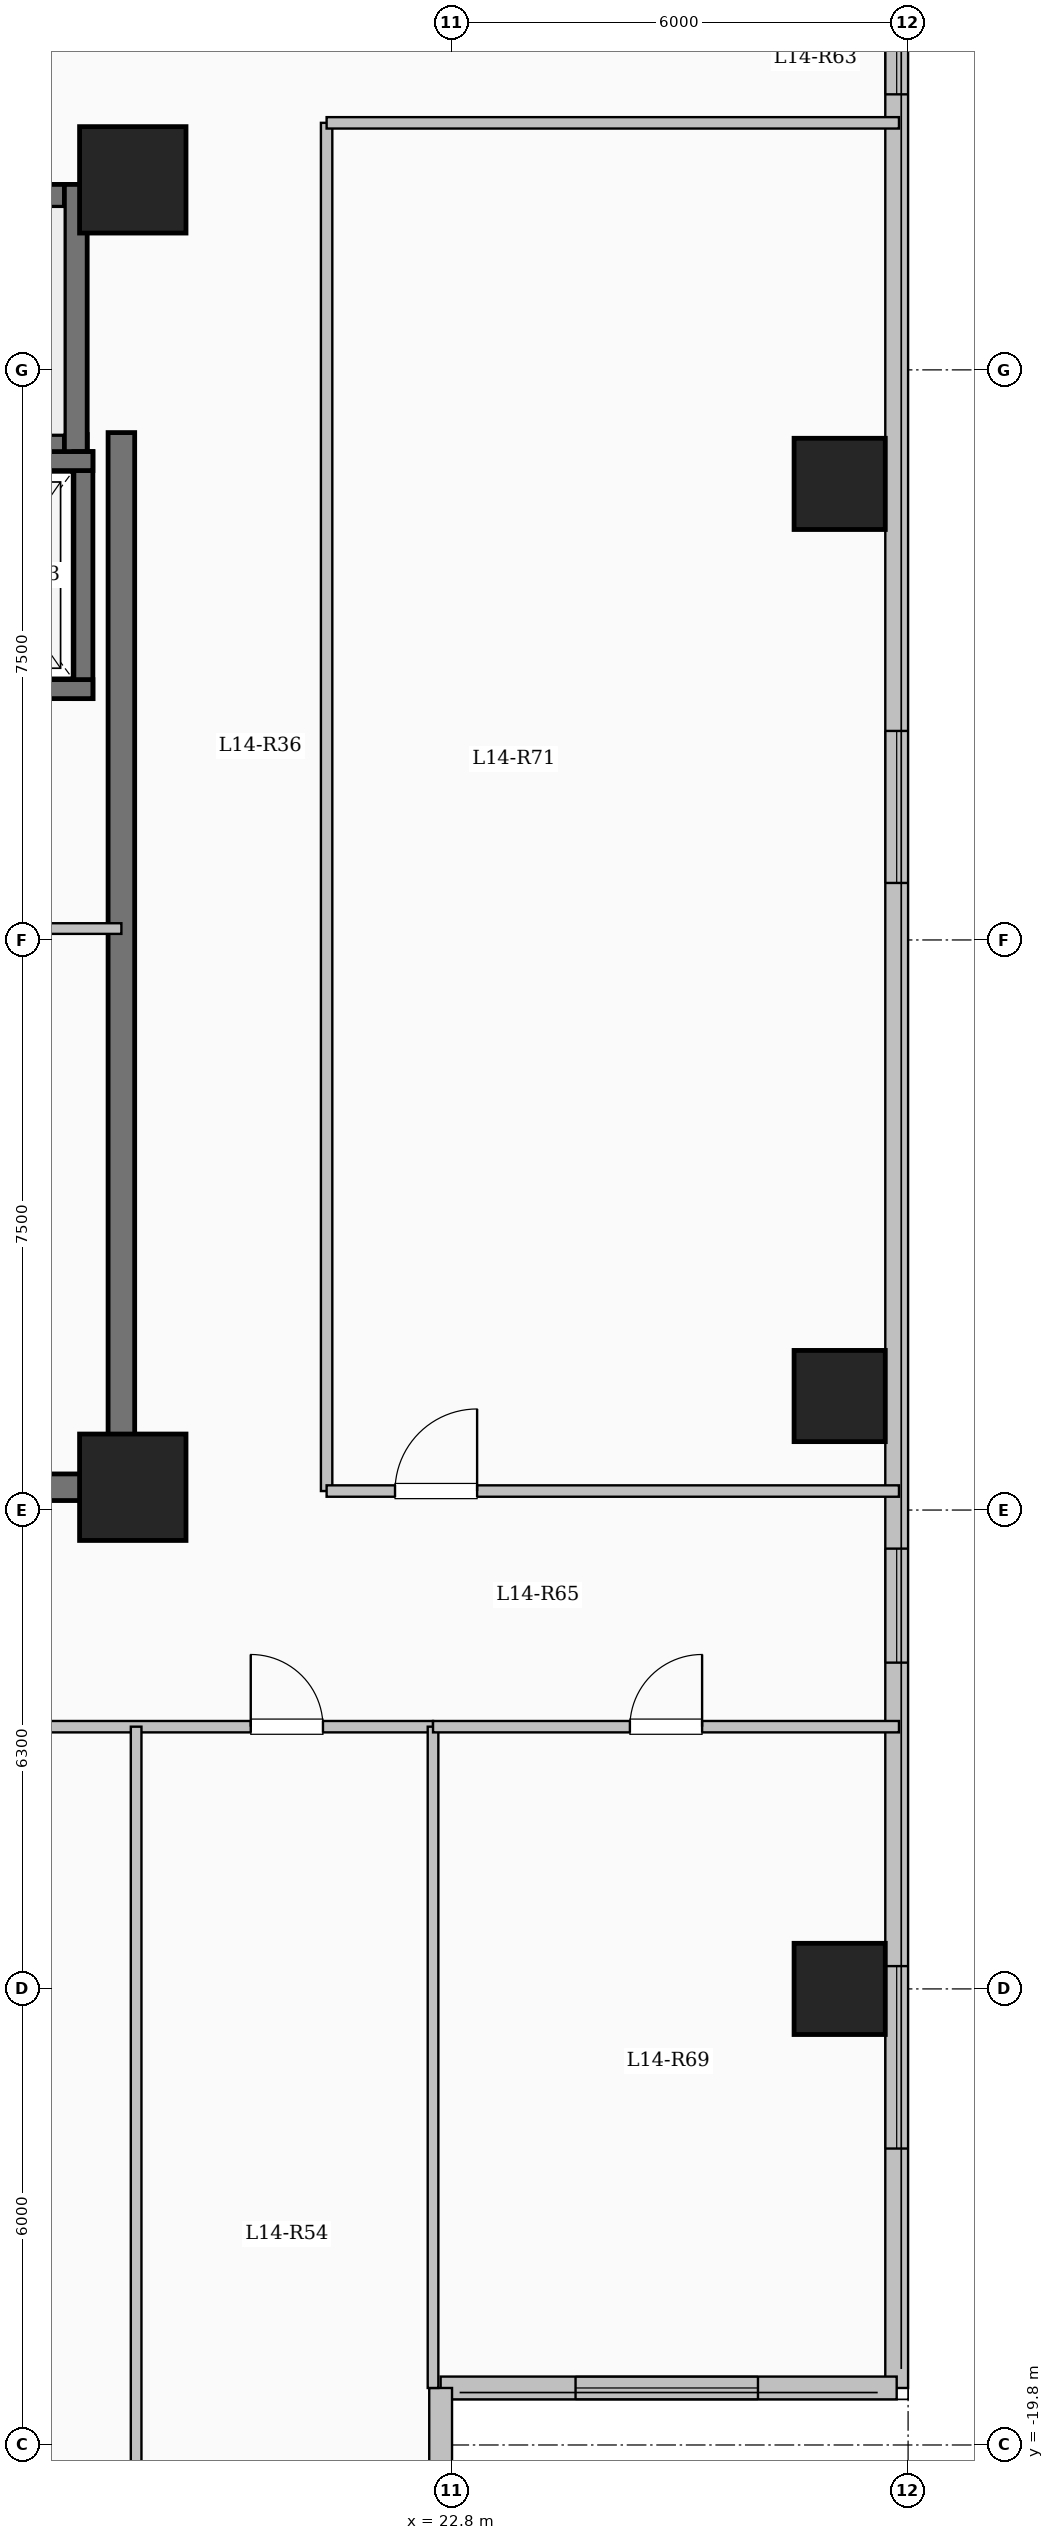
"""IFC4 building model, lengths in metres.
Left out: names, types, materials, properties, quantities, classifications, styles, units other than length and angle.
Written with IfcOpenShell. Run it as: python <this file> out.ifc"""

import sys

from ifc_helpers import new_model, si_unit, direction, frame, frame_2d, origin, origin_2d, place, context, subcontext, project, spatial, rectangle, extrude, element, fill, save


model = new_model("IFC4")
c1 = context("Model", 3, precision=1e-05, world=origin(), true_north=direction((0.0, 1.0)))
c2 = subcontext(c1, "Body", "Model", "MODEL_VIEW")
j1 = project(units=[si_unit("LENGTHUNIT", "METRE"), si_unit("PLANEANGLEUNIT", "RADIAN")], contexts=[c1])
p1 = place(None, origin())
s1 = spatial("IfcSite", under=j1, at=p1, CompositionType="ELEMENT")
p2 = place(p1, origin())
s2 = spatial("IfcBuilding", under=s1, at=p2, CompositionType="ELEMENT")
p3 = place(p2, frame((0.0, 0.0, 54.15)))
s3 = spatial("IfcBuildingStorey", under=s2, at=p3, CompositionType="ELEMENT", Elevation=54.15)
for number, where, z_axis, x_axis in (
    (1, (18.6, -7.2, 0.0), (0.0, 0.0, 1.0), (1.0, 0.0, 0.0)),
    (2, (18.6, 10.0, 0.0), (0.0, 0.0, 1.0), (1.0, 0.0, 0.0)),
):
    element("IfcColumn", number, at=place(p3, frame(where, z_axis=z_axis, x_axis=x_axis)), inside=s3, PredefinedType="COLUMN", context=c2, shape_type="SweptSolid", body=[
        extrude(rectangle(XDim=1.4, YDim=1.4, at=origin_2d()), origin(), (0.0, 0.0, 1.0), 3.35),
    ])
for number, where, z_axis, x_axis in (
    (3, (27.9, -13.8, 0.0), (0.0, 0.0, 1.0), (1.0, 0.0, 0.0)),
    (4, (27.9, -6.0, 0.0), (0.0, 0.0, 1.0), (1.0, 0.0, 0.0)),
    (5, (27.9, 6.0, 0.0), (0.0, 0.0, 1.0), (1.0, 0.0, 0.0)),
):
    element("IfcColumn", number, at=place(p3, frame(where, z_axis=z_axis, x_axis=x_axis)), inside=s3, PredefinedType="COLUMN", context=c2, shape_type="SweptSolid", body=[
        extrude(rectangle(XDim=1.2, YDim=1.2, at=origin_2d()), origin(), (0.0, 0.0, 1.0), 3.35),
    ])
p4 = place(p3, frame((28.65, 19.05, 0.0), z_axis=(0.0, 0.0, 1.0), x_axis=(0.0, -1.0, 0.0)))
e6 = element("IfcWall", 6, at=p4, inside=s3, PredefinedType="SOLIDWALL", context=c2, shape_type="SweptSolid", body=[
    extrude(rectangle(XDim=38.1, YDim=0.3, at=frame_2d((19.05, 0.0))), origin(), (0.0, 0.0, 1.0), 3.1),
])
p5 = place(p4, frame((2.275, 0.0, 0.9)))
e7 = element("IfcOpeningElement", 7, at=p5, cuts=e6, PredefinedType="OPENING", context=c2, shape_type="SweptSolid", body=[
    extrude(rectangle(XDim=2.0, YDim=1.7, at=frame_2d((1.0, 0.85))), frame((0.0, 0.16, 0.0), z_axis=(0.0, -1.0, 0.0), x_axis=(1.0, 0.0, 0.0)), (0.0, 0.0, 1.0), 0.32),
])
p6 = place(p4, frame((6.925, 0.0, 0.95)))
e8 = element("IfcOpeningElement", 8, at=p6, cuts=e6, PredefinedType="OPENING", context=c2, shape_type="SweptSolid", body=[
    extrude(rectangle(XDim=1.0, YDim=1.5, at=frame_2d((0.5, 0.75))), frame((0.0, 0.16, 0.0), z_axis=(0.0, -1.0, 0.0), x_axis=(1.0, 0.0, 0.0)), (0.0, 0.0, 1.0), 0.32),
])
p7 = place(p4, frame((16.3, 0.0, 0.9)))
e9 = element("IfcOpeningElement", 9, at=p7, cuts=e6, PredefinedType="OPENING", context=c2, shape_type="SweptSolid", body=[
    extrude(rectangle(XDim=2.0, YDim=1.7, at=frame_2d((1.0, 0.85))), frame((0.0, 0.16, 0.0), z_axis=(0.0, -1.0, 0.0), x_axis=(1.0, 0.0, 0.0)), (0.0, 0.0, 1.0), 0.32),
])
p8 = place(p4, frame((27.058, 0.0, 0.9)))
e10 = element("IfcOpeningElement", 10, at=p8, cuts=e6, PredefinedType="OPENING", context=c2, shape_type="SweptSolid", body=[
    extrude(rectangle(XDim=1.5, YDim=1.65, at=frame_2d((0.75, 0.825))), frame((0.0, 0.16, 0.0), z_axis=(0.0, -1.0, 0.0), x_axis=(1.0, 0.0, 0.0)), (0.0, 0.0, 1.0), 0.32),
])
p9 = place(p4, frame((32.55, 0.0, 0.9)))
e11 = element("IfcOpeningElement", 11, at=p9, cuts=e6, PredefinedType="OPENING", context=c2, shape_type="SweptSolid", body=[
    extrude(rectangle(XDim=2.4, YDim=1.8, at=frame_2d((1.2, 0.9))), frame((0.0, 0.16, 0.0), z_axis=(0.0, -1.0, 0.0), x_axis=(1.0, 0.0, 0.0)), (0.0, 0.0, 1.0), 0.32),
])
p10 = place(p3, frame((28.65, -19.05, 0.0), z_axis=(0.0, 0.0, 1.0), x_axis=(-1.0, 0.0, 0.0)))
e12 = element("IfcWall", 12, at=p10, inside=s3, PredefinedType="SOLIDWALL", context=c2, shape_type="SweptSolid", body=[
    extrude(rectangle(XDim=6.0, YDim=0.3, at=frame_2d((3.0, 0.0))), origin(), (0.0, 0.0, 1.0), 3.1),
])
p11 = place(p10, frame((1.825, 0.0, 0.9)))
e13 = element("IfcOpeningElement", 13, at=p11, cuts=e12, PredefinedType="OPENING", context=c2, shape_type="SweptSolid", body=[
    extrude(rectangle(XDim=2.4, YDim=1.8, at=frame_2d((1.2, 0.9))), frame((0.0, 0.16, 0.0), z_axis=(0.0, -1.0, 0.0), x_axis=(1.0, 0.0, 0.0)), (0.0, 0.0, 1.0), 0.32),
])
p12 = place(p3, frame((22.65, -19.05, 0.0), z_axis=(0.0, 0.0, 1.0), x_axis=(0.0, -1.0, 0.0)))
e14 = element("IfcWall", 14, at=p12, inside=s3, PredefinedType="SOLIDWALL", context=c2, shape_type="SweptSolid", body=[
    extrude(rectangle(XDim=4.5, YDim=0.3, at=frame_2d((2.25, 0.0))), origin(), (0.0, 0.0, 1.0), 3.1),
])
p13 = place(p12, frame((1.232, 0.0, 0.9)))
e15 = element("IfcOpeningElement", 15, at=p13, cuts=e14, PredefinedType="OPENING", context=c2, shape_type="SweptSolid", body=[
    extrude(rectangle(XDim=2.0, YDim=1.7, at=frame_2d((1.0, 0.85))), frame((0.0, 0.16, 0.0), z_axis=(0.0, -1.0, 0.0), x_axis=(1.0, 0.0, 0.0)), (0.0, 0.0, 1.0), 0.32),
])
p14 = place(p3, frame((10.0, 9.79, 0.0), z_axis=(0.0, 0.0, 1.0), x_axis=(1.0, 0.0, 0.0)))
e16 = element("IfcWall", 16, at=p14, inside=s3, PredefinedType="SHEAR", context=c2, shape_type="SweptSolid", body=[
    extrude(rectangle(XDim=8.0, YDim=0.3, at=frame_2d((4.0, 0.0))), origin(), (0.0, 0.0, 1.0), 3.35),
])
p15 = place(p3, frame((10.0, 6.5, 0.0), z_axis=(0.0, 0.0, 1.0), x_axis=(1.0, 0.0, 0.0)))
e17 = element("IfcWall", 17, at=p15, inside=s3, PredefinedType="SHEAR", context=c2, shape_type="SweptSolid", body=[
    extrude(rectangle(XDim=8.0, YDim=0.3, at=frame_2d((4.0, 0.0))), origin(), (0.0, 0.0, 1.0), 3.35),
])
p16 = place(p15, frame((0.55, 0.0, 0.0)))
e18 = element("IfcOpeningElement", 18, at=p16, cuts=e17, PredefinedType="OPENING", context=c2, shape_type="SweptSolid", body=[
    extrude(rectangle(XDim=1.0, YDim=2.15, at=frame_2d((0.5, 1.075))), frame((0.0, 0.16, 0.0), z_axis=(0.0, -1.0, 0.0), x_axis=(1.0, 0.0, 0.0)), (0.0, 0.0, 1.0), 0.32),
])
p17 = place(p3, frame((17.85, 6.35, 0.0), z_axis=(0.0, 0.0, 1.0), x_axis=(0.0, 1.0, 0.0)))
e19 = element("IfcWall", 19, at=p17, inside=s3, PredefinedType="SHEAR", context=c2, shape_type="SweptSolid", body=[
    extrude(rectangle(XDim=3.59, YDim=0.3, at=frame_2d((1.795, 0.0))), origin(), (0.0, 0.0, 1.0), 3.35),
])
p18 = place(p3, frame((17.95, 3.175, 0.0), z_axis=(0.0, 0.0, 1.0), x_axis=(0.0, 1.0, 0.0)))
e20 = element("IfcWall", 20, at=p18, inside=s3, PredefinedType="SHEAR", context=c2, shape_type="SweptSolid", body=[
    extrude(rectangle(XDim=3.25, YDim=0.25, at=frame_2d((1.625, 0.0))), origin(), (0.0, 0.0, 1.0), 3.35),
])
for number, where, z_axis, x_axis in (
    (21, (15.525, 3.3, 0.0), (0.0, 0.0, 1.0), (1.0, 0.0, 0.0)),
    (22, (15.525, 6.3, 0.0), (0.0, 0.0, 1.0), (1.0, 0.0, 0.0)),
):
    element("IfcWall", number, at=place(p3, frame(where, z_axis=z_axis, x_axis=x_axis)), inside=s3, PredefinedType="SHEAR", context=c2, shape_type="SweptSolid", body=[
        extrude(rectangle(XDim=2.55, YDim=0.25, at=frame_2d((1.275, 0.0))), origin(), (0.0, 0.0, 1.0), 3.35),
    ])
p19 = place(p3, frame((18.45, -7.375, 0.0), z_axis=(0.0, 0.0, 1.0), x_axis=(0.0, 1.0, 0.0)))
e23 = element("IfcWall", 23, at=p19, inside=s3, PredefinedType="SHEAR", context=c2, shape_type="SweptSolid", body=[
    extrude(rectangle(XDim=14.05, YDim=0.35, at=frame_2d((7.025, 0.0))), origin(), (0.0, 0.0, 1.0), 3.35),
])
p20 = place(p3, frame((10.075, -7.2, 0.0), z_axis=(0.0, 0.0, 1.0), x_axis=(1.0, 0.0, 0.0)))
e24 = element("IfcWall", 24, at=p20, inside=s3, PredefinedType="SHEAR", context=c2, shape_type="SweptSolid", body=[
    extrude(rectangle(XDim=8.55, YDim=0.35, at=frame_2d((4.275, 0.0))), origin(), (0.0, 0.0, 1.0), 3.35),
])
p21 = place(p3, frame((15.4, 0.15, 0.0), z_axis=(0.0, 0.0, 1.0), x_axis=(1.0, 0.0, 0.0)))
e25 = element("IfcWall", 25, at=p21, inside=s3, PredefinedType="PARTITIONING", context=c2, shape_type="SweptSolid", body=[
    extrude(rectangle(XDim=3.05, YDim=0.14, at=frame_2d((1.525, 0.0))), origin(), (0.0, 0.0, 1.0), 3.1),
])
p22 = place(p21, frame((1.05, 0.0, 0.0)))
e26 = element("IfcOpeningElement", 26, at=p22, cuts=e25, PredefinedType="OPENING", context=c2, shape_type="SweptSolid", body=[
    extrude(rectangle(XDim=0.9, YDim=2.08, at=frame_2d((0.45, 1.04))), frame((0.0, 0.08, 0.0), z_axis=(0.0, -1.0, 0.0), x_axis=(1.0, 0.0, 0.0)), (0.0, 0.0, 1.0), 0.16),
])
p23 = place(p3, frame((21.15, -7.25, 0.0), z_axis=(0.0, 0.0, 1.0), x_axis=(0.0, 1.0, 0.0)))
e27 = element("IfcWall", 27, at=p23, inside=s3, PredefinedType="PARTITIONING", context=c2, shape_type="SweptSolid", body=[
    extrude(rectangle(XDim=18.0, YDim=0.15, at=frame_2d((9.0, 0.0))), origin(), (0.0, 0.0, 1.0), 2.585),
])
p24 = place(p3, frame((8.55, -10.35, 0.0), z_axis=(0.0, 0.0, 1.0), x_axis=(1.0, 0.0, 0.0)))
e28 = element("IfcWall", 28, at=p24, inside=s3, PredefinedType="PARTITIONING", context=c2, shape_type="SweptSolid", body=[
    extrude(rectangle(XDim=14.0, YDim=0.15, at=frame_2d((7.0, 0.0))), origin(), (0.0, 0.0, 1.0), 3.1),
])
p25 = place(p24, frame((2.056, 0.0, 0.0)))
e29 = element("IfcOpeningElement", 29, at=p25, cuts=e28, PredefinedType="OPENING", context=c2, shape_type="SweptSolid", body=[
    extrude(rectangle(XDim=0.95, YDim=2.15, at=frame_2d((0.475, 1.075))), frame((0.0, 0.085, 0.0), z_axis=(0.0, -1.0, 0.0), x_axis=(1.0, 0.0, 0.0)), (0.0, 0.0, 1.0), 0.17),
])
p26 = place(p24, frame((7.108, 0.0, 0.0)))
e30 = element("IfcOpeningElement", 30, at=p26, cuts=e28, PredefinedType="OPENING", context=c2, shape_type="SweptSolid", body=[
    extrude(rectangle(XDim=0.95, YDim=2.15, at=frame_2d((0.475, 1.075))), frame((0.0, 0.085, 0.0), z_axis=(0.0, -1.0, 0.0), x_axis=(1.0, 0.0, 0.0)), (0.0, 0.0, 1.0), 0.17),
])
p27 = place(p24, frame((11.602, 0.0, 0.0)))
e31 = element("IfcOpeningElement", 31, at=p27, cuts=e28, PredefinedType="OPENING", context=c2, shape_type="SweptSolid", body=[
    extrude(rectangle(XDim=0.95, YDim=2.15, at=frame_2d((0.475, 1.075))), frame((0.0, 0.085, 0.0), z_axis=(0.0, -1.0, 0.0), x_axis=(1.0, 0.0, 0.0)), (0.0, 0.0, 1.0), 0.17),
])
p28 = place(p3, frame((18.644, -23.55, 0.0), z_axis=(0.0, 0.0, 1.0), x_axis=(0.0, 1.0, 0.0)))
e32 = element("IfcWall", 32, at=p28, inside=s3, PredefinedType="PARTITIONING", context=c2, shape_type="SweptSolid", body=[
    extrude(rectangle(XDim=13.2, YDim=0.14, at=frame_2d((6.6, 0.0))), origin(), (0.0, 0.0, 1.0), 3.1),
])
p29 = place(p3, frame((21.15, -7.25, 0.0), z_axis=(0.0, 0.0, 1.0), x_axis=(1.0, 0.0, 0.0)))
e33 = element("IfcWall", 33, at=p29, inside=s3, PredefinedType="PARTITIONING", context=c2, shape_type="SweptSolid", body=[
    extrude(rectangle(XDim=7.53, YDim=0.15, at=frame_2d((3.765, 0.0))), origin(), (0.0, 0.0, 1.0), 3.1),
])
p30 = place(p29, frame((0.9, 0.0, 0.0)))
e34 = element("IfcOpeningElement", 34, at=p30, cuts=e33, PredefinedType="OPENING", context=c2, shape_type="SweptSolid", body=[
    extrude(rectangle(XDim=1.08, YDim=2.15, at=frame_2d((0.54, 1.075))), frame((0.0, 0.085, 0.0), z_axis=(0.0, -1.0, 0.0), x_axis=(1.0, 0.0, 0.0)), (0.0, 0.0, 1.0), 0.17),
])
p31 = place(p3, frame((21.15, 10.75, 0.0), z_axis=(0.0, 0.0, 1.0), x_axis=(1.0, 0.0, 0.0)))
e35 = element("IfcWall", 35, at=p31, inside=s3, PredefinedType="PARTITIONING", context=c2, shape_type="SweptSolid", body=[
    extrude(rectangle(XDim=7.53, YDim=0.15, at=frame_2d((3.765, 0.0))), origin(), (0.0, 0.0, 1.0), 3.1),
])
p32 = place(p3, frame((22.55, -19.05, 0.0), z_axis=(0.0, 0.0, 1.0), x_axis=(0.0, 1.0, 0.0)))
e36 = element("IfcWall", 36, at=p32, inside=s3, PredefinedType="PARTITIONING", context=c2, shape_type="SweptSolid", body=[
    extrude(rectangle(XDim=8.7, YDim=0.14, at=frame_2d((4.35, 0.0))), origin(), (0.0, 0.0, 1.0), 3.1),
])
p33 = place(p3, frame((22.55, -10.35, 0.0), z_axis=(0.0, 0.0, 1.0), x_axis=(1.0, 0.0, 0.0)))
e37 = element("IfcWall", 37, at=p33, inside=s3, PredefinedType="PARTITIONING", context=c2, shape_type="SweptSolid", body=[
    extrude(rectangle(XDim=6.13, YDim=0.15, at=frame_2d((3.065, 0.0))), origin(), (0.0, 0.0, 1.0), 3.1),
])
p34 = place(p33, frame((2.59, 0.0, 0.0)))
e38 = element("IfcOpeningElement", 38, at=p34, cuts=e37, PredefinedType="OPENING", context=c2, shape_type="SweptSolid", body=[
    extrude(rectangle(XDim=0.95, YDim=2.15, at=frame_2d((0.475, 1.075))), frame((0.0, 0.085, 0.0), z_axis=(0.0, -1.0, 0.0), x_axis=(1.0, 0.0, 0.0)), (0.0, 0.0, 1.0), 0.17),
])
p35 = place(p6, origin())
e39 = element("IfcWindow", 39, at=p35, inside=s3, PartitioningType="SINGLE_PANEL", PredefinedType="WINDOW", context=c2, shape_type="SweptSolid", body=[
    extrude(rectangle(XDim=1.0, YDim=1.5, at=frame_2d((0.5, 0.75))), frame((0.0, 0.03, 0.0), z_axis=(0.0, -1.0, 0.0), x_axis=(1.0, 0.0, 0.0)), (0.0, 0.0, 1.0), 0.06),
])
fill(e8, e39)
p36 = place(p7, origin())
e40 = element("IfcWindow", 40, at=p36, inside=s3, PartitioningType="SINGLE_PANEL", PredefinedType="WINDOW", context=c2, shape_type="SweptSolid", body=[
    extrude(rectangle(XDim=2.0, YDim=1.7, at=frame_2d((1.0, 0.85))), frame((0.0, 0.03, 0.0), z_axis=(0.0, -1.0, 0.0), x_axis=(1.0, 0.0, 0.0)), (0.0, 0.0, 1.0), 0.06),
])
fill(e9, e40)
p37 = place(p8, origin())
e41 = element("IfcWindow", 41, at=p37, inside=s3, PartitioningType="SINGLE_PANEL", PredefinedType="WINDOW", context=c2, shape_type="SweptSolid", body=[
    extrude(rectangle(XDim=1.5, YDim=1.65, at=frame_2d((0.75, 0.825))), frame((0.0, 0.03, 0.0), z_axis=(0.0, -1.0, 0.0), x_axis=(1.0, 0.0, 0.0)), (0.0, 0.0, 1.0), 0.06),
])
fill(e10, e41)
p38 = place(p9, origin())
e42 = element("IfcWindow", 42, at=p38, inside=s3, PartitioningType="SINGLE_PANEL", PredefinedType="WINDOW", context=c2, shape_type="SweptSolid", body=[
    extrude(rectangle(XDim=2.4, YDim=1.8, at=frame_2d((1.2, 0.9))), frame((0.0, 0.03, 0.0), z_axis=(0.0, -1.0, 0.0), x_axis=(1.0, 0.0, 0.0)), (0.0, 0.0, 1.0), 0.06),
])
fill(e11, e42)
p39 = place(p11, origin())
e43 = element("IfcWindow", 43, at=p39, inside=s3, PartitioningType="SINGLE_PANEL", PredefinedType="WINDOW", context=c2, shape_type="SweptSolid", body=[
    extrude(rectangle(XDim=2.4, YDim=1.8, at=frame_2d((1.2, 0.9))), frame((0.0, 0.03, 0.0), z_axis=(0.0, -1.0, 0.0), x_axis=(1.0, 0.0, 0.0)), (0.0, 0.0, 1.0), 0.06),
])
fill(e13, e43)
p40 = place(p27, origin())
e44 = element("IfcDoor", 44, at=p40, inside=s3, OperationType="SINGLE_SWING_LEFT", PredefinedType="DOOR", context=c2, shape_type="SweptSolid", body=[
    extrude(rectangle(XDim=0.95, YDim=2.15, at=frame_2d((0.475, 1.075))), frame((0.0, 0.025, 0.0), z_axis=(0.0, -1.0, 0.0), x_axis=(1.0, 0.0, 0.0)), (0.0, 0.0, 1.0), 0.05),
])
fill(e31, e44)
p41 = place(p34, origin())
e45 = element("IfcDoor", 45, at=p41, inside=s3, OperationType="SINGLE_SWING_RIGHT", PredefinedType="DOOR", context=c2, shape_type="SweptSolid", body=[
    extrude(rectangle(XDim=0.95, YDim=2.15, at=frame_2d((0.475, 1.075))), frame((0.0, 0.025, 0.0), z_axis=(0.0, -1.0, 0.0), x_axis=(1.0, 0.0, 0.0)), (0.0, 0.0, 1.0), 0.05),
])
fill(e38, e45)
p42 = place(p30, origin())
e46 = element("IfcDoor", 46, at=p42, inside=s3, OperationType="SINGLE_SWING_RIGHT", PredefinedType="DOOR", context=c2, shape_type="SweptSolid", body=[
    extrude(rectangle(XDim=1.08, YDim=2.15, at=frame_2d((0.54, 1.075))), frame((0.0, 0.025, 0.0), z_axis=(0.0, -1.0, 0.0), x_axis=(1.0, 0.0, 0.0)), (0.0, 0.0, 1.0), 0.05),
])
fill(e34, e46)
save(model, sys.argv[1])
